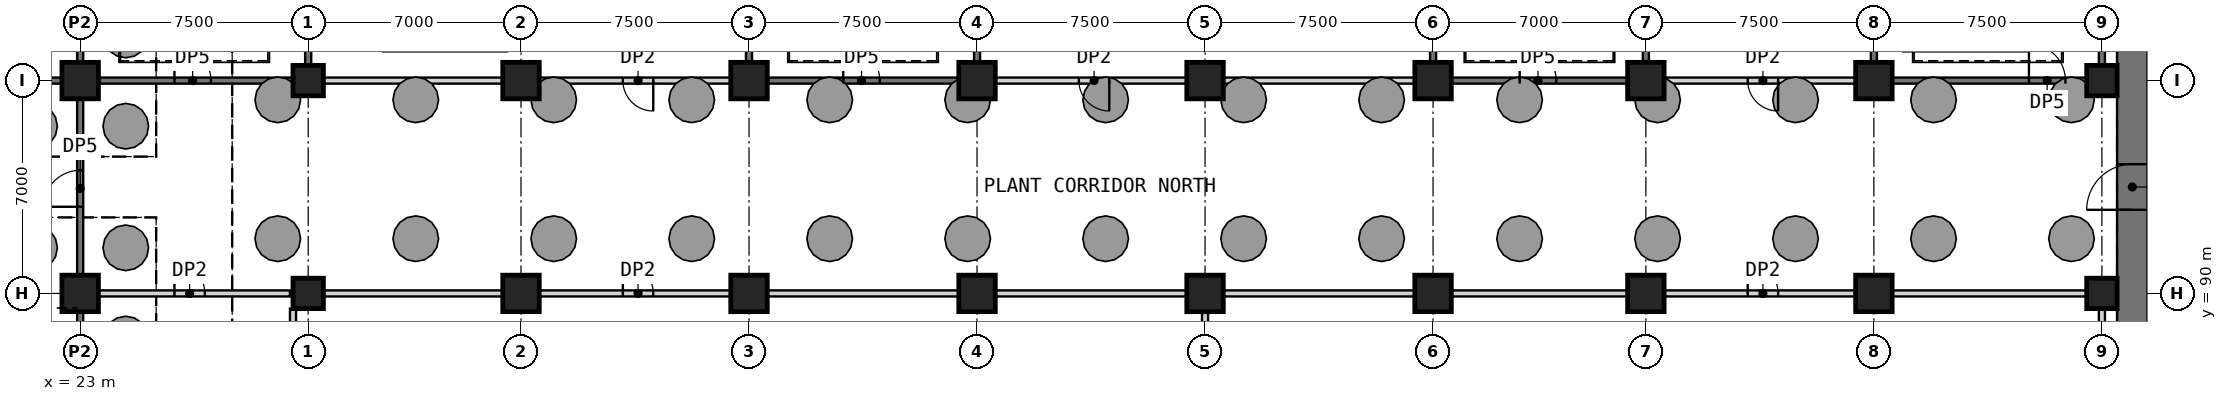
"""IFC4 building model, lengths in metres.
Left out: names, types, materials, properties, quantities, classifications, styles, units other than length and angle.
Written with IfcOpenShell. Run it as: python <this file> out.ifc"""

import sys

from ifc_helpers import new_model, si_unit, direction, frame, frame_2d, origin, origin_2d, place, context, subcontext, project, spatial, rectangle, extrude, element, fill, save


model = new_model("IFC4")
c1 = context("Model", 3, precision=1e-05, world=origin(), true_north=direction((0.0, 1.0)))
c2 = subcontext(c1, "Body", "Model", "MODEL_VIEW")
j1 = project(units=[si_unit("LENGTHUNIT", "METRE"), si_unit("PLANEANGLEUNIT", "RADIAN")], contexts=[c1])
p1 = place(None, origin())
s1 = spatial("IfcSite", under=j1, at=p1, CompositionType="ELEMENT")
p2 = place(p1, origin())
s2 = spatial("IfcBuilding", under=s1, at=p2, CompositionType="ELEMENT")
p3 = place(p2, frame((0.0, 0.0, -12.0)))
s3 = spatial("IfcBuildingStorey", under=s2, at=p3, CompositionType="ELEMENT", Elevation=-12.0)
p4 = place(p3, frame((90.5, 25.0, 0.0), z_axis=(0.0, 0.0, 1.0), x_axis=(0.0, 1.0, 0.0)))
e1 = element("IfcWall", 1, at=p4, inside=s3, PredefinedType="SHEAR", context=c2, shape_type="SweptSolid", body=[
    extrude(rectangle(XDim=92.5, YDim=1.0, at=frame_2d((46.25, 0.0))), origin(), (0.0, 0.0, 1.0), 5.4),
])
p5 = place(p4, frame((23.15, 0.0, 0.0)))
e2 = element("IfcOpeningElement", 2, at=p5, cuts=e1, PredefinedType="OPENING", context=c2, shape_type="SweptSolid", body=[
    extrude(rectangle(XDim=1.5, YDim=2.1, at=frame_2d((0.75, 1.05))), frame((0.0, 0.51, 0.0), z_axis=(0.0, -1.0, 0.0), x_axis=(1.0, 0.0, 0.0)), (0.0, 0.0, 1.0), 1.02),
])
p6 = place(p4, frame((67.75, 0.0, 0.0)))
e3 = element("IfcOpeningElement", 3, at=p6, cuts=e1, PredefinedType="OPENING", context=c2, shape_type="SweptSolid", body=[
    extrude(rectangle(XDim=1.5, YDim=2.1, at=frame_2d((0.75, 1.05))), frame((0.0, 0.51, 0.0), z_axis=(0.0, -1.0, 0.0), x_axis=(1.0, 0.0, 0.0)), (0.0, 0.0, 1.0), 1.02),
])
for number, where, z_axis, x_axis in (
    (4, (30.5, 90.0, 0.0), (0.0, 0.0, 1.0), (1.0, 0.0, 0.0)),
    (5, (30.5, 97.0, 0.0), (0.0, 0.0, 1.0), (1.0, 0.0, 0.0)),
):
    element("IfcColumn", number, at=place(p3, frame(where, z_axis=z_axis, x_axis=x_axis)), inside=s3, PredefinedType="COLUMN", context=c2, shape_type="SweptSolid", body=[
        extrude(rectangle(XDim=1.0, YDim=1.0, at=origin_2d()), origin(), (0.0, 0.0, 1.0), 6.0),
    ])
for number, where, z_axis, x_axis in (
    (6, (37.5, 90.0, 0.0), (0.0, 0.0, 1.0), (1.0, 0.0, 0.0)),
    (7, (37.5, 97.0, 0.0), (0.0, 0.0, 1.0), (1.0, 0.0, 0.0)),
    (8, (45.0, 90.0, 0.0), (0.0, 0.0, 1.0), (1.0, 0.0, 0.0)),
    (9, (45.0, 97.0, 0.0), (0.0, 0.0, 1.0), (1.0, 0.0, 0.0)),
    (10, (52.5, 90.0, 0.0), (0.0, 0.0, 1.0), (1.0, 0.0, 0.0)),
    (11, (52.5, 97.0, 0.0), (0.0, 0.0, 1.0), (1.0, 0.0, 0.0)),
    (12, (60.0, 90.0, 0.0), (0.0, 0.0, 1.0), (1.0, 0.0, 0.0)),
    (13, (60.0, 97.0, 0.0), (0.0, 0.0, 1.0), (1.0, 0.0, 0.0)),
    (14, (67.5, 90.0, 0.0), (0.0, 0.0, 1.0), (1.0, 0.0, 0.0)),
    (15, (67.5, 97.0, 0.0), (0.0, 0.0, 1.0), (1.0, 0.0, 0.0)),
    (16, (74.5, 90.0, 0.0), (0.0, 0.0, 1.0), (1.0, 0.0, 0.0)),
    (17, (74.5, 97.0, 0.0), (0.0, 0.0, 1.0), (1.0, 0.0, 0.0)),
    (18, (82.0, 90.0, 0.0), (0.0, 0.0, 1.0), (1.0, 0.0, 0.0)),
    (19, (82.0, 97.0, 0.0), (0.0, 0.0, 1.0), (1.0, 0.0, 0.0)),
):
    element("IfcColumn", number, at=place(p3, frame(where, z_axis=z_axis, x_axis=x_axis)), inside=s3, PredefinedType="COLUMN", context=c2, shape_type="SweptSolid", body=[
        extrude(rectangle(XDim=1.2, YDim=1.2, at=origin_2d()), origin(), (0.0, 0.0, 1.0), 6.0),
    ])
for number, where, z_axis, x_axis in (
    (20, (89.5, 90.0, 0.0), (0.0, 0.0, 1.0), (1.0, 0.0, 0.0)),
    (21, (89.5, 97.0, 0.0), (0.0, 0.0, 1.0), (1.0, 0.0, 0.0)),
):
    element("IfcColumn", number, at=place(p3, frame(where, z_axis=z_axis, x_axis=x_axis)), inside=s3, PredefinedType="COLUMN", context=c2, shape_type="SweptSolid", body=[
        extrude(rectangle(XDim=1.0, YDim=1.0, at=origin_2d()), origin(), (0.0, 0.0, 1.0), 6.0),
    ])
for number, where, z_axis, x_axis in (
    (22, (23.0, 90.0, 0.0), (0.0, 0.0, 1.0), (1.0, 0.0, 0.0)),
    (23, (23.0, 97.0, 0.0), (0.0, 0.0, 1.0), (1.0, 0.0, 0.0)),
):
    element("IfcColumn", number, at=place(p3, frame(where, z_axis=z_axis, x_axis=x_axis)), inside=s3, PredefinedType="COLUMN", context=c2, shape_type="SweptSolid", body=[
        extrude(rectangle(XDim=1.2, YDim=1.2, at=origin_2d()), origin(), (0.0, 0.0, 1.0), 6.0),
    ])
p7 = place(p3, frame((23.6, 90.0, 0.0), z_axis=(0.0, 0.0, 1.0), x_axis=(1.0, 0.0, 0.0)))
e24 = element("IfcWall", 24, at=p7, inside=s3, PredefinedType="PARTITIONING", context=c2, shape_type="SweptSolid", body=[
    extrude(rectangle(XDim=6.3, YDim=0.2, at=frame_2d((3.15, 0.0))), origin(), (0.0, 0.0, 1.0), 5.4),
])
p8 = place(p7, frame((2.5, 0.0, 0.0)))
e25 = element("IfcOpeningElement", 25, at=p8, cuts=e24, PredefinedType="OPENING", context=c2, shape_type="SweptSolid", body=[
    extrude(rectangle(XDim=1.0, YDim=2.1, at=frame_2d((0.5, 1.05))), frame((0.0, 0.11, 0.0), z_axis=(0.0, -1.0, 0.0), x_axis=(1.0, 0.0, 0.0)), (0.0, 0.0, 1.0), 0.22),
])
p9 = place(p3, frame((31.0, 90.0, 0.0), z_axis=(0.0, 0.0, 1.0), x_axis=(1.0, 0.0, 0.0)))
e26 = element("IfcWall", 26, at=p9, inside=s3, PredefinedType="PARTITIONING", context=c2, shape_type="SweptSolid", body=[
    extrude(rectangle(XDim=5.9, YDim=0.2, at=frame_2d((2.95, 0.0))), origin(), (0.0, 0.0, 1.0), 5.4),
])
p10 = place(p3, frame((38.1, 90.0, 0.0), z_axis=(0.0, 0.0, 1.0), x_axis=(1.0, 0.0, 0.0)))
e27 = element("IfcWall", 27, at=p10, inside=s3, PredefinedType="PARTITIONING", context=c2, shape_type="SweptSolid", body=[
    extrude(rectangle(XDim=6.3, YDim=0.2, at=frame_2d((3.15, 0.0))), origin(), (0.0, 0.0, 1.0), 5.4),
])
p11 = place(p10, frame((2.75, 0.0, 0.0)))
e28 = element("IfcOpeningElement", 28, at=p11, cuts=e27, PredefinedType="OPENING", context=c2, shape_type="SweptSolid", body=[
    extrude(rectangle(XDim=1.0, YDim=2.1, at=frame_2d((0.5, 1.05))), frame((0.0, 0.11, 0.0), z_axis=(0.0, -1.0, 0.0), x_axis=(1.0, 0.0, 0.0)), (0.0, 0.0, 1.0), 0.22),
])
for number, where, z_axis, x_axis in (
    (29, (45.6, 90.0, 0.0), (0.0, 0.0, 1.0), (1.0, 0.0, 0.0)),
    (30, (53.1, 90.0, 0.0), (0.0, 0.0, 1.0), (1.0, 0.0, 0.0)),
    (31, (60.6, 90.0, 0.0), (0.0, 0.0, 1.0), (1.0, 0.0, 0.0)),
):
    element("IfcWall", number, at=place(p3, frame(where, z_axis=z_axis, x_axis=x_axis)), inside=s3, PredefinedType="PARTITIONING", context=c2, shape_type="SweptSolid", body=[
        extrude(rectangle(XDim=6.3, YDim=0.2, at=frame_2d((3.15, 0.0))), origin(), (0.0, 0.0, 1.0), 5.4),
    ])
p12 = place(p3, frame((68.1, 90.0, 0.0), z_axis=(0.0, 0.0, 1.0), x_axis=(1.0, 0.0, 0.0)))
e32 = element("IfcWall", 32, at=p12, inside=s3, PredefinedType="PARTITIONING", context=c2, shape_type="SweptSolid", body=[
    extrude(rectangle(XDim=5.8, YDim=0.2, at=frame_2d((2.9, 0.0))), origin(), (0.0, 0.0, 1.0), 5.4),
])
p13 = place(p3, frame((75.1, 90.0, 0.0), z_axis=(0.0, 0.0, 1.0), x_axis=(1.0, 0.0, 0.0)))
e33 = element("IfcWall", 33, at=p13, inside=s3, PredefinedType="PARTITIONING", context=c2, shape_type="SweptSolid", body=[
    extrude(rectangle(XDim=6.3, YDim=0.2, at=frame_2d((3.15, 0.0))), origin(), (0.0, 0.0, 1.0), 5.4),
])
p14 = place(p13, frame((2.75, 0.0, 0.0)))
e34 = element("IfcOpeningElement", 34, at=p14, cuts=e33, PredefinedType="OPENING", context=c2, shape_type="SweptSolid", body=[
    extrude(rectangle(XDim=1.0, YDim=2.1, at=frame_2d((0.5, 1.05))), frame((0.0, 0.11, 0.0), z_axis=(0.0, -1.0, 0.0), x_axis=(1.0, 0.0, 0.0)), (0.0, 0.0, 1.0), 0.22),
])
p15 = place(p3, frame((82.6, 90.0, 0.0), z_axis=(0.0, 0.0, 1.0), x_axis=(1.0, 0.0, 0.0)))
e35 = element("IfcWall", 35, at=p15, inside=s3, PredefinedType="PARTITIONING", context=c2, shape_type="SweptSolid", body=[
    extrude(rectangle(XDim=6.4, YDim=0.2, at=frame_2d((3.2, 0.0))), origin(), (0.0, 0.0, 1.0), 5.4),
])
p16 = place(p3, frame((16.1, 97.0, 0.0), z_axis=(0.0, 0.0, 1.0), x_axis=(1.0, 0.0, 0.0)))
e36 = element("IfcWall", 36, at=p16, inside=s3, PredefinedType="SHEAR", context=c2, shape_type="SweptSolid", body=[
    extrude(rectangle(XDim=6.3, YDim=0.2, at=frame_2d((3.15, 0.0))), origin(), (0.0, 0.0, 1.0), 5.4),
])
p17 = place(p3, frame((23.6, 97.0, 0.0), z_axis=(0.0, 0.0, 1.0), x_axis=(1.0, 0.0, 0.0)))
e37 = element("IfcWall", 37, at=p17, inside=s3, PredefinedType="SHEAR", context=c2, shape_type="SweptSolid", body=[
    extrude(rectangle(XDim=6.4, YDim=0.2, at=frame_2d((3.2, 0.0))), origin(), (0.0, 0.0, 1.0), 5.4),
])
p18 = place(p17, frame((2.5, 0.0, 0.0)))
e38 = element("IfcOpeningElement", 38, at=p18, cuts=e37, PredefinedType="OPENING", context=c2, shape_type="SweptSolid", body=[
    extrude(rectangle(XDim=1.2, YDim=2.1, at=frame_2d((0.6, 1.05))), frame((0.0, 0.11, 0.0), z_axis=(0.0, -1.0, 0.0), x_axis=(1.0, 0.0, 0.0)), (0.0, 0.0, 1.0), 0.22),
])
p19 = place(p3, frame((31.0, 97.0, 0.0), z_axis=(0.0, 0.0, 1.0), x_axis=(1.0, 0.0, 0.0)))
e39 = element("IfcWall", 39, at=p19, inside=s3, PredefinedType="PARTITIONING", context=c2, shape_type="SweptSolid", body=[
    extrude(rectangle(XDim=5.9, YDim=0.2, at=frame_2d((2.95, 0.0))), origin(), (0.0, 0.0, 1.0), 5.4),
])
p20 = place(p3, frame((44.4, 97.0, 0.0), z_axis=(0.0, 0.0, 1.0), x_axis=(-1.0, 0.0, 0.0)))
e40 = element("IfcWall", 40, at=p20, inside=s3, PredefinedType="PARTITIONING", context=c2, shape_type="SweptSolid", body=[
    extrude(rectangle(XDim=6.3, YDim=0.2, at=frame_2d((3.15, 0.0))), origin(), (0.0, 0.0, 1.0), 5.4),
])
p21 = place(p20, frame((2.55, 0.0, 0.0)))
e41 = element("IfcOpeningElement", 41, at=p21, cuts=e40, PredefinedType="OPENING", context=c2, shape_type="SweptSolid", body=[
    extrude(rectangle(XDim=1.0, YDim=2.1, at=frame_2d((0.5, 1.05))), frame((0.0, 0.11, 0.0), z_axis=(0.0, -1.0, 0.0), x_axis=(1.0, 0.0, 0.0)), (0.0, 0.0, 1.0), 0.22),
])
p22 = place(p3, frame((45.6, 97.0, 0.0), z_axis=(0.0, 0.0, 1.0), x_axis=(1.0, 0.0, 0.0)))
e42 = element("IfcWall", 42, at=p22, inside=s3, PredefinedType="SHEAR", context=c2, shape_type="SweptSolid", body=[
    extrude(rectangle(XDim=6.3, YDim=0.2, at=frame_2d((3.15, 0.0))), origin(), (0.0, 0.0, 1.0), 5.4),
])
p23 = place(p22, frame((2.5, 0.0, 0.0)))
e43 = element("IfcOpeningElement", 43, at=p23, cuts=e42, PredefinedType="OPENING", context=c2, shape_type="SweptSolid", body=[
    extrude(rectangle(XDim=1.2, YDim=2.1, at=frame_2d((0.6, 1.05))), frame((0.0, 0.11, 0.0), z_axis=(0.0, -1.0, 0.0), x_axis=(1.0, 0.0, 0.0)), (0.0, 0.0, 1.0), 0.22),
])
p24 = place(p3, frame((59.4, 97.0, 0.0), z_axis=(0.0, 0.0, 1.0), x_axis=(-1.0, 0.0, 0.0)))
e44 = element("IfcWall", 44, at=p24, inside=s3, PredefinedType="PARTITIONING", context=c2, shape_type="SweptSolid", body=[
    extrude(rectangle(XDim=6.3, YDim=0.2, at=frame_2d((3.15, 0.0))), origin(), (0.0, 0.0, 1.0), 5.4),
])
p25 = place(p24, frame((2.55, 0.0, 0.0)))
e45 = element("IfcOpeningElement", 45, at=p25, cuts=e44, PredefinedType="OPENING", context=c2, shape_type="SweptSolid", body=[
    extrude(rectangle(XDim=1.0, YDim=2.1, at=frame_2d((0.5, 1.05))), frame((0.0, 0.11, 0.0), z_axis=(0.0, -1.0, 0.0), x_axis=(1.0, 0.0, 0.0)), (0.0, 0.0, 1.0), 0.22),
])
p26 = place(p3, frame((60.6, 97.0, 0.0), z_axis=(0.0, 0.0, 1.0), x_axis=(1.0, 0.0, 0.0)))
e46 = element("IfcWall", 46, at=p26, inside=s3, PredefinedType="PARTITIONING", context=c2, shape_type="SweptSolid", body=[
    extrude(rectangle(XDim=6.3, YDim=0.2, at=frame_2d((3.15, 0.0))), origin(), (0.0, 0.0, 1.0), 5.4),
])
p27 = place(p3, frame((68.1, 97.0, 0.0), z_axis=(0.0, 0.0, 1.0), x_axis=(1.0, 0.0, 0.0)))
e47 = element("IfcWall", 47, at=p27, inside=s3, PredefinedType="SHEAR", context=c2, shape_type="SweptSolid", body=[
    extrude(rectangle(XDim=5.8, YDim=0.2, at=frame_2d((2.9, 0.0))), origin(), (0.0, 0.0, 1.0), 5.4),
])
p28 = place(p27, frame((2.25, 0.0, 0.0)))
e48 = element("IfcOpeningElement", 48, at=p28, cuts=e47, PredefinedType="OPENING", context=c2, shape_type="SweptSolid", body=[
    extrude(rectangle(XDim=1.2, YDim=2.1, at=frame_2d((0.6, 1.05))), frame((0.0, 0.11, 0.0), z_axis=(0.0, -1.0, 0.0), x_axis=(1.0, 0.0, 0.0)), (0.0, 0.0, 1.0), 0.22),
])
p29 = place(p3, frame((81.4, 97.0, 0.0), z_axis=(0.0, 0.0, 1.0), x_axis=(-1.0, 0.0, 0.0)))
e49 = element("IfcWall", 49, at=p29, inside=s3, PredefinedType="PARTITIONING", context=c2, shape_type="SweptSolid", body=[
    extrude(rectangle(XDim=6.3, YDim=0.2, at=frame_2d((3.15, 0.0))), origin(), (0.0, 0.0, 1.0), 5.4),
])
p30 = place(p29, frame((2.55, 0.0, 0.0)))
e50 = element("IfcOpeningElement", 50, at=p30, cuts=e49, PredefinedType="OPENING", context=c2, shape_type="SweptSolid", body=[
    extrude(rectangle(XDim=1.0, YDim=2.1, at=frame_2d((0.5, 1.05))), frame((0.0, 0.11, 0.0), z_axis=(0.0, -1.0, 0.0), x_axis=(1.0, 0.0, 0.0)), (0.0, 0.0, 1.0), 0.22),
])
p31 = place(p3, frame((82.6, 97.0, 0.0), z_axis=(0.0, 0.0, 1.0), x_axis=(1.0, 0.0, 0.0)))
e51 = element("IfcWall", 51, at=p31, inside=s3, PredefinedType="SHEAR", context=c2, shape_type="SweptSolid", body=[
    extrude(rectangle(XDim=6.4, YDim=0.2, at=frame_2d((3.2, 0.0))), origin(), (0.0, 0.0, 1.0), 5.4),
])
p32 = place(p31, frame((4.5, 0.0, 0.0)))
e52 = element("IfcOpeningElement", 52, at=p32, cuts=e51, PredefinedType="OPENING", context=c2, shape_type="SweptSolid", body=[
    extrude(rectangle(XDim=1.2, YDim=2.1, at=frame_2d((0.6, 1.05))), frame((0.0, 0.11, 0.0), z_axis=(0.0, -1.0, 0.0), x_axis=(1.0, 0.0, 0.0)), (0.0, 0.0, 1.0), 0.22),
])
p33 = place(p3, frame((23.0, 83.1, 0.0), z_axis=(0.0, 0.0, 1.0), x_axis=(0.0, 1.0, 0.0)))
e53 = element("IfcWall", 53, at=p33, inside=s3, PredefinedType="SHEAR", context=c2, shape_type="SweptSolid", body=[
    extrude(rectangle(XDim=6.3, YDim=0.2, at=frame_2d((3.15, 0.0))), origin(), (0.0, 0.0, 1.0), 5.4),
])
p34 = place(p3, frame((23.0, 90.6, 0.0), z_axis=(0.0, 0.0, 1.0), x_axis=(0.0, 1.0, 0.0)))
e54 = element("IfcWall", 54, at=p34, inside=s3, PredefinedType="SHEAR", context=c2, shape_type="SweptSolid", body=[
    extrude(rectangle(XDim=5.8, YDim=0.2, at=frame_2d((2.9, 0.0))), origin(), (0.0, 0.0, 1.0), 5.4),
])
p35 = place(p34, frame((2.25, 0.0, 0.0)))
e55 = element("IfcOpeningElement", 55, at=p35, cuts=e54, PredefinedType="OPENING", context=c2, shape_type="SweptSolid", body=[
    extrude(rectangle(XDim=1.2, YDim=2.1, at=frame_2d((0.6, 1.05))), frame((0.0, 0.11, 0.0), z_axis=(0.0, -1.0, 0.0), x_axis=(1.0, 0.0, 0.0)), (0.0, 0.0, 1.0), 0.22),
])
p36 = place(p3, frame((23.0, 97.6, 0.0), z_axis=(0.0, 0.0, 1.0), x_axis=(0.0, 1.0, 0.0)))
e56 = element("IfcWall", 56, at=p36, inside=s3, PredefinedType="SHEAR", context=c2, shape_type="SweptSolid", body=[
    extrude(rectangle(XDim=6.3, YDim=0.2, at=frame_2d((3.15, 0.0))), origin(), (0.0, 0.0, 1.0), 5.4),
])
for number, where, z_axis, x_axis in (
    (57, (30.5, 97.5, 0.0), (0.0, 0.0, 1.0), (0.0, 1.0, 0.0)),
    (58, (45.0, 97.6, 0.0), (0.0, 0.0, 1.0), (0.0, 1.0, 0.0)),
    (59, (52.5, 97.6, 0.0), (0.0, 0.0, 1.0), (0.0, 1.0, 0.0)),
    (60, (67.5, 97.6, 0.0), (0.0, 0.0, 1.0), (0.0, 1.0, 0.0)),
    (61, (74.5, 97.6, 0.0), (0.0, 0.0, 1.0), (0.0, 1.0, 0.0)),
    (62, (82.0, 97.6, 0.0), (0.0, 0.0, 1.0), (0.0, 1.0, 0.0)),
):
    element("IfcWall", number, at=place(p3, frame(where, z_axis=z_axis, x_axis=x_axis)), inside=s3, PredefinedType="SHEAR", context=c2, shape_type="SweptSolid", body=[
        extrude(rectangle(XDim=6.4, YDim=0.2, at=frame_2d((3.2, 0.0))), origin(), (0.0, 0.0, 1.0), 5.4),
    ])
p37 = place(p3, frame((89.5, 83.0, 0.0), z_axis=(0.0, 0.0, 1.0), x_axis=(0.0, 1.0, 0.0)))
e63 = element("IfcWall", 63, at=p37, inside=s3, PredefinedType="PARTITIONING", context=c2, shape_type="SweptSolid", body=[
    extrude(rectangle(XDim=6.5, YDim=0.2, at=frame_2d((3.25, 0.0))), origin(), (0.0, 0.0, 1.0), 5.4),
])
p38 = place(p3, frame((89.5, 97.5, 0.0), z_axis=(0.0, 0.0, 1.0), x_axis=(0.0, 1.0, 0.0)))
e64 = element("IfcWall", 64, at=p38, inside=s3, PredefinedType="SHEAR", context=c2, shape_type="SweptSolid", body=[
    extrude(rectangle(XDim=6.4, YDim=0.2, at=frame_2d((3.2, 0.0))), origin(), (0.0, 0.0, 1.0), 5.4),
])
p39 = place(p3, frame((30.0, 82.6, 0.0), z_axis=(0.0, 0.0, 1.0), x_axis=(0.0, 1.0, 0.0)))
e65 = element("IfcWall", 65, at=p39, inside=s3, PredefinedType="PARTITIONING", context=c2, shape_type="SweptSolid", body=[
    extrude(rectangle(XDim=6.9, YDim=0.2, at=frame_2d((3.45, 0.0))), origin(), (0.0, 0.0, 1.0), 5.4),
])
p40 = place(p3, frame((60.0, 82.6, 0.0), z_axis=(0.0, 0.0, 1.0), x_axis=(0.0, 1.0, 0.0)))
e66 = element("IfcWall", 66, at=p40, inside=s3, PredefinedType="PARTITIONING", context=c2, shape_type="SweptSolid", body=[
    extrude(rectangle(XDim=6.8, YDim=0.2, at=frame_2d((3.4, 0.0))), origin(), (0.0, 0.0, 1.0), 5.4),
])
p41 = place(p8, origin())
e67 = element("IfcDoor", 67, at=p41, inside=s3, OperationType="SINGLE_SWING_LEFT", PredefinedType="DOOR", context=c2, shape_type="SweptSolid", body=[
    extrude(rectangle(XDim=1.0, YDim=2.1, at=frame_2d((0.5, 1.05))), frame((0.0, 0.025, 0.0), z_axis=(0.0, -1.0, 0.0), x_axis=(1.0, 0.0, 0.0)), (0.0, 0.0, 1.0), 0.05),
])
fill(e25, e67)
p42 = place(p11, origin())
e68 = element("IfcDoor", 68, at=p42, inside=s3, OperationType="SINGLE_SWING_LEFT", PredefinedType="DOOR", context=c2, shape_type="SweptSolid", body=[
    extrude(rectangle(XDim=1.0, YDim=2.1, at=frame_2d((0.5, 1.05))), frame((0.0, 0.025, 0.0), z_axis=(0.0, -1.0, 0.0), x_axis=(1.0, 0.0, 0.0)), (0.0, 0.0, 1.0), 0.05),
])
fill(e28, e68)
p43 = place(p14, origin())
e69 = element("IfcDoor", 69, at=p43, inside=s3, OperationType="SINGLE_SWING_LEFT", PredefinedType="DOOR", context=c2, shape_type="SweptSolid", body=[
    extrude(rectangle(XDim=1.0, YDim=2.1, at=frame_2d((0.5, 1.05))), frame((0.0, 0.025, 0.0), z_axis=(0.0, -1.0, 0.0), x_axis=(1.0, 0.0, 0.0)), (0.0, 0.0, 1.0), 0.05),
])
fill(e34, e69)
p44 = place(p18, origin())
e70 = element("IfcDoor", 70, at=p44, inside=s3, OperationType="SINGLE_SWING_LEFT", PredefinedType="DOOR", context=c2, shape_type="SweptSolid", body=[
    extrude(rectangle(XDim=1.2, YDim=2.1, at=frame_2d((0.6, 1.05))), frame((0.0, 0.025, 0.0), z_axis=(0.0, -1.0, 0.0), x_axis=(1.0, 0.0, 0.0)), (0.0, 0.0, 1.0), 0.05),
])
fill(e38, e70)
p45 = place(p21, origin())
e71 = element("IfcDoor", 71, at=p45, inside=s3, OperationType="SINGLE_SWING_LEFT", PredefinedType="DOOR", context=c2, shape_type="SweptSolid", body=[
    extrude(rectangle(XDim=1.0, YDim=2.1, at=frame_2d((0.5, 1.05))), frame((0.0, 0.025, 0.0), z_axis=(0.0, -1.0, 0.0), x_axis=(1.0, 0.0, 0.0)), (0.0, 0.0, 1.0), 0.05),
])
fill(e41, e71)
p46 = place(p23, origin())
e72 = element("IfcDoor", 72, at=p46, inside=s3, OperationType="SINGLE_SWING_LEFT", PredefinedType="DOOR", context=c2, shape_type="SweptSolid", body=[
    extrude(rectangle(XDim=1.2, YDim=2.1, at=frame_2d((0.6, 1.05))), frame((0.0, 0.025, 0.0), z_axis=(0.0, -1.0, 0.0), x_axis=(1.0, 0.0, 0.0)), (0.0, 0.0, 1.0), 0.05),
])
fill(e43, e72)
p47 = place(p25, origin())
e73 = element("IfcDoor", 73, at=p47, inside=s3, OperationType="SINGLE_SWING_LEFT", PredefinedType="DOOR", context=c2, shape_type="SweptSolid", body=[
    extrude(rectangle(XDim=1.0, YDim=2.1, at=frame_2d((0.5, 1.05))), frame((0.0, 0.025, 0.0), z_axis=(0.0, -1.0, 0.0), x_axis=(1.0, 0.0, 0.0)), (0.0, 0.0, 1.0), 0.05),
])
fill(e45, e73)
p48 = place(p28, origin())
e74 = element("IfcDoor", 74, at=p48, inside=s3, OperationType="SINGLE_SWING_LEFT", PredefinedType="DOOR", context=c2, shape_type="SweptSolid", body=[
    extrude(rectangle(XDim=1.2, YDim=2.1, at=frame_2d((0.6, 1.05))), frame((0.0, 0.025, 0.0), z_axis=(0.0, -1.0, 0.0), x_axis=(1.0, 0.0, 0.0)), (0.0, 0.0, 1.0), 0.05),
])
fill(e48, e74)
p49 = place(p30, origin())
e75 = element("IfcDoor", 75, at=p49, inside=s3, OperationType="SINGLE_SWING_LEFT", PredefinedType="DOOR", context=c2, shape_type="SweptSolid", body=[
    extrude(rectangle(XDim=1.0, YDim=2.1, at=frame_2d((0.5, 1.05))), frame((0.0, 0.025, 0.0), z_axis=(0.0, -1.0, 0.0), x_axis=(1.0, 0.0, 0.0)), (0.0, 0.0, 1.0), 0.05),
])
fill(e50, e75)
p50 = place(p32, origin())
e76 = element("IfcDoor", 76, at=p50, inside=s3, OperationType="SINGLE_SWING_LEFT", PredefinedType="DOOR", context=c2, shape_type="SweptSolid", body=[
    extrude(rectangle(XDim=1.2, YDim=2.1, at=frame_2d((0.6, 1.05))), frame((0.0, 0.025, 0.0), z_axis=(0.0, -1.0, 0.0), x_axis=(1.0, 0.0, 0.0)), (0.0, 0.0, 1.0), 0.05),
])
fill(e52, e76)
p51 = place(p35, origin())
e77 = element("IfcDoor", 77, at=p51, inside=s3, OperationType="SINGLE_SWING_LEFT", PredefinedType="DOOR", context=c2, shape_type="SweptSolid", body=[
    extrude(rectangle(XDim=1.2, YDim=2.1, at=frame_2d((0.6, 1.05))), frame((0.0, 0.025, 0.0), z_axis=(0.0, -1.0, 0.0), x_axis=(1.0, 0.0, 0.0)), (0.0, 0.0, 1.0), 0.05),
])
fill(e55, e77)
p52 = place(p6, origin())
e78 = element("IfcDoor", 78, at=p52, inside=s3, OperationType="SINGLE_SWING_LEFT", PredefinedType="DOOR", context=c2, shape_type="SweptSolid", body=[
    extrude(rectangle(XDim=1.5, YDim=2.1, at=frame_2d((0.75, 1.05))), frame((0.0, 0.025, 0.0), z_axis=(0.0, -1.0, 0.0), x_axis=(1.0, 0.0, 0.0)), (0.0, 0.0, 1.0), 0.05),
])
fill(e3, e78)
save(model, sys.argv[1])
